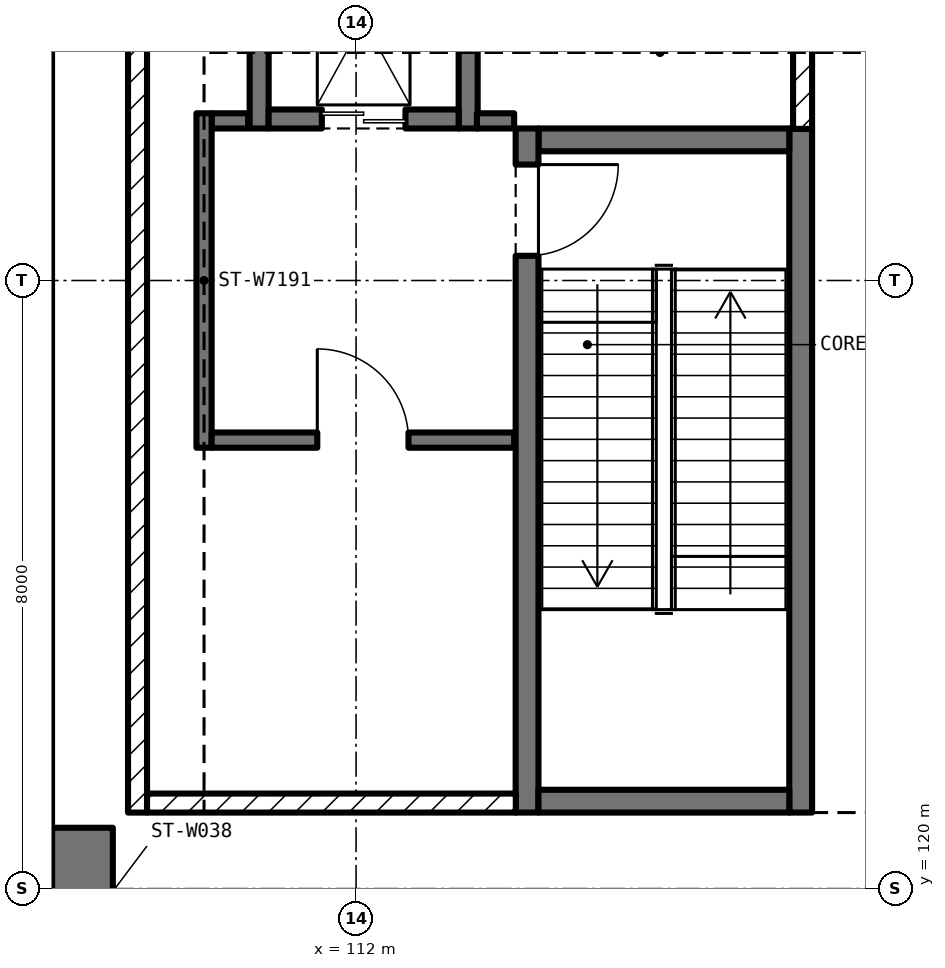
"""IFC4 building model, lengths in metres.
Left out: names, types, materials, properties, quantities, classifications, styles, units other than length and angle.
Written with IfcOpenShell. Run it as: python <this file> out.ifc"""

import sys

from ifc_helpers import new_model, si_unit, direction, frame, frame_2d, origin, place, context, subcontext, project, spatial, rectangle, extrude, element, fill, save


model = new_model("IFC4")
c1 = context("Model", 3, precision=1e-05, world=origin(), true_north=direction((0.0, 1.0)))
c2 = subcontext(c1, "Body", "Model", "MODEL_VIEW")
j1 = project(units=[si_unit("LENGTHUNIT", "METRE"), si_unit("PLANEANGLEUNIT", "RADIAN")], contexts=[c1])
p1 = place(None, origin())
s1 = spatial("IfcSite", under=j1, at=p1, CompositionType="ELEMENT")
p2 = place(p1, origin())
s2 = spatial("IfcBuilding", under=s1, at=p2, CompositionType="ELEMENT")
p3 = place(p2, frame((0.0, 0.0, 28.0)))
s3 = spatial("IfcBuildingStorey", under=s2, at=p3, CompositionType="ELEMENT", Elevation=28.0)
p4 = place(p3, frame((108.4, 95.2, 0.0), z_axis=(0.0, 0.0, 1.0), x_axis=(0.0, 1.0, 0.0)))
e1 = element("IfcWall", 1, at=p4, inside=s3, PredefinedType="SHEAR", context=c2, shape_type="SweptSolid", body=[
    extrude(rectangle(XDim=25.6, YDim=0.8, at=frame_2d((12.8, 0.0))), origin(), (0.0, 0.0, 1.0), 6.0),
])
p5 = place(p4, frame((1.1, 0.0, 2.6)))
e2 = element("IfcOpeningElement", 2, at=p5, cuts=e1, PredefinedType="OPENING", context=c2, shape_type="SweptSolid", body=[
    extrude(rectangle(XDim=2.4, YDim=1.2, at=frame_2d((1.2, 0.6))), frame((0.0, 0.412, 0.0), z_axis=(0.0, -1.0, 0.0), x_axis=(1.0, 0.0, 0.0)), (0.0, 0.0, 1.0), 0.824),
])
p6 = place(p4, frame((4.1, 0.0, 2.6)))
e3 = element("IfcOpeningElement", 3, at=p6, cuts=e1, PredefinedType="OPENING", context=c2, shape_type="SweptSolid", body=[
    extrude(rectangle(XDim=2.4, YDim=1.2, at=frame_2d((1.2, 0.6))), frame((0.0, 0.412, 0.0), z_axis=(0.0, -1.0, 0.0), x_axis=(1.0, 0.0, 0.0)), (0.0, 0.0, 1.0), 0.824),
])
p7 = place(p4, frame((7.1, 0.0, 2.6)))
e4 = element("IfcOpeningElement", 4, at=p7, cuts=e1, PredefinedType="OPENING", context=c2, shape_type="SweptSolid", body=[
    extrude(rectangle(XDim=2.4, YDim=1.2, at=frame_2d((1.2, 0.6))), frame((0.0, 0.412, 0.0), z_axis=(0.0, -1.0, 0.0), x_axis=(1.0, 0.0, 0.0)), (0.0, 0.0, 1.0), 0.824),
])
p8 = place(p4, frame((10.1, 0.0, 2.6)))
e5 = element("IfcOpeningElement", 5, at=p8, cuts=e1, PredefinedType="OPENING", context=c2, shape_type="SweptSolid", body=[
    extrude(rectangle(XDim=2.4, YDim=1.2, at=frame_2d((1.2, 0.6))), frame((0.0, 0.412, 0.0), z_axis=(0.0, -1.0, 0.0), x_axis=(1.0, 0.0, 0.0)), (0.0, 0.0, 1.0), 0.824),
])
p9 = place(p4, frame((13.1, 0.0, 2.6)))
e6 = element("IfcOpeningElement", 6, at=p9, cuts=e1, PredefinedType="OPENING", context=c2, shape_type="SweptSolid", body=[
    extrude(rectangle(XDim=2.4, YDim=1.2, at=frame_2d((1.2, 0.6))), frame((0.0, 0.412, 0.0), z_axis=(0.0, -1.0, 0.0), x_axis=(1.0, 0.0, 0.0)), (0.0, 0.0, 1.0), 0.824),
])
p10 = place(p4, frame((16.1, 0.0, 2.6)))
e7 = element("IfcOpeningElement", 7, at=p10, cuts=e1, PredefinedType="OPENING", context=c2, shape_type="SweptSolid", body=[
    extrude(rectangle(XDim=2.4, YDim=1.2, at=frame_2d((1.2, 0.6))), frame((0.0, 0.412, 0.0), z_axis=(0.0, -1.0, 0.0), x_axis=(1.0, 0.0, 0.0)), (0.0, 0.0, 1.0), 0.824),
])
p11 = place(p4, frame((19.1, 0.0, 2.6)))
e8 = element("IfcOpeningElement", 8, at=p11, cuts=e1, PredefinedType="OPENING", context=c2, shape_type="SweptSolid", body=[
    extrude(rectangle(XDim=2.4, YDim=1.2, at=frame_2d((1.2, 0.6))), frame((0.0, 0.412, 0.0), z_axis=(0.0, -1.0, 0.0), x_axis=(1.0, 0.0, 0.0)), (0.0, 0.0, 1.0), 0.824),
])
p12 = place(p4, frame((22.1, 0.0, 2.6)))
e9 = element("IfcOpeningElement", 9, at=p12, cuts=e1, PredefinedType="OPENING", context=c2, shape_type="SweptSolid", body=[
    extrude(rectangle(XDim=2.4, YDim=1.2, at=frame_2d((1.2, 0.6))), frame((0.0, 0.412, 0.0), z_axis=(0.0, -1.0, 0.0), x_axis=(1.0, 0.0, 0.0)), (0.0, 0.0, 1.0), 0.824),
])
p13 = place(p3, frame((117.85, 121.0, 0.0), z_axis=(0.0, 0.0, 1.0), x_axis=(0.0, 1.0, 0.0)))
e10 = element("IfcWall", 10, at=p13, inside=s3, PredefinedType="SOLIDWALL", context=c2, shape_type="SweptSolid", body=[
    extrude(rectangle(XDim=9.0, YDim=0.3, at=frame_2d((4.5, 0.0))), origin(), (0.0, 0.0, 1.0), 6.0),
])
p14 = place(p3, frame((117.7, 129.85, 0.0), z_axis=(0.0, 0.0, 1.0), x_axis=(-1.0, 0.0, 0.0)))
e11 = element("IfcWall", 11, at=p14, inside=s3, PredefinedType="SOLIDWALL", context=c2, shape_type="SweptSolid", body=[
    extrude(rectangle(XDim=3.3, YDim=0.3, at=frame_2d((1.65, 0.0))), origin(), (0.0, 0.0, 1.0), 6.0),
])
p15 = place(p3, frame((114.25, 130.0, 0.0), z_axis=(0.0, 0.0, 1.0), x_axis=(0.0, -1.0, 0.0)))
e12 = element("IfcWall", 12, at=p15, inside=s3, PredefinedType="SOLIDWALL", context=c2, shape_type="SweptSolid", body=[
    extrude(rectangle(XDim=9.0, YDim=0.3, at=frame_2d((4.5, 0.0))), origin(), (0.0, 0.0, 1.0), 6.0),
])
p16 = place(p15, frame((0.475, 0.0, 0.0)))
e13 = element("IfcOpeningElement", 13, at=p16, cuts=e12, PredefinedType="OPENING", context=c2, shape_type="SweptSolid", body=[
    extrude(rectangle(XDim=1.2, YDim=2.1, at=frame_2d((0.6, 1.05))), frame((0.0, 0.162, 0.0), z_axis=(0.0, -1.0, 0.0), x_axis=(1.0, 0.0, 0.0)), (0.0, 0.0, 1.0), 0.324),
])
p17 = place(p3, frame((114.4, 121.15, 0.0), z_axis=(0.0, 0.0, 1.0), x_axis=(1.0, 0.0, 0.0)))
e14 = element("IfcWall", 14, at=p17, inside=s3, PredefinedType="SOLIDWALL", context=c2, shape_type="SweptSolid", body=[
    extrude(rectangle(XDim=3.3, YDim=0.3, at=frame_2d((1.65, 0.0))), origin(), (0.0, 0.0, 1.0), 6.0),
])
for number, where, z_axis, x_axis in (
    (15, (113.475, 130.0, 0.0), (0.0, 0.0, 1.0), (0.0, 1.0, 0.0)),
    (16, (110.725, 134.0, 0.0), (0.0, 0.0, 1.0), (0.0, -1.0, 0.0)),
):
    element("IfcWall", number, at=place(p3, frame(where, z_axis=z_axis, x_axis=x_axis)), inside=s3, PredefinedType="SOLIDWALL", context=c2, shape_type="SweptSolid", body=[
        extrude(rectangle(XDim=4.0, YDim=0.25, at=frame_2d((2.0, 0.0))), origin(), (0.0, 0.0, 1.0), 6.0),
    ])
p18 = place(p3, frame((110.85, 130.125, 0.0), z_axis=(0.0, 0.0, 1.0), x_axis=(1.0, 0.0, 0.0)))
e17 = element("IfcWall", 17, at=p18, inside=s3, PredefinedType="SOLIDWALL", context=c2, shape_type="SweptSolid", body=[
    extrude(rectangle(XDim=2.5, YDim=0.25, at=frame_2d((1.25, 0.0))), origin(), (0.0, 0.0, 1.0), 6.0),
])
p19 = place(p18, frame((0.7, 0.0, 0.0)))
e18 = element("IfcOpeningElement", 18, at=p19, cuts=e17, PredefinedType="OPENING", context=c2, shape_type="SweptSolid", body=[
    extrude(rectangle(XDim=1.1, YDim=2.1, at=frame_2d((0.55, 1.05))), frame((0.0, 0.137, 0.0), z_axis=(0.0, -1.0, 0.0), x_axis=(1.0, 0.0, 0.0)), (0.0, 0.0, 1.0), 0.274),
])
p20 = place(p3, frame((114.08, 130.1, 0.0), z_axis=(0.0, 0.0, 1.0), x_axis=(-1.0, 0.0, 0.0)))
e19 = element("IfcWall", 19, at=p20, inside=s3, PredefinedType="PARTITIONING", context=c2, shape_type="SweptSolid", body=[
    extrude(rectangle(XDim=0.49, YDim=0.2, at=frame_2d((0.245, 0.0))), origin(), (0.0, 0.0, 1.0), 5.8),
])
p21 = place(p3, frame((110.58, 130.1, 0.0), z_axis=(0.0, 0.0, 1.0), x_axis=(-1.0, 0.0, 0.0)))
e20 = element("IfcWall", 20, at=p21, inside=s3, PredefinedType="PARTITIONING", context=c2, shape_type="SweptSolid", body=[
    extrude(rectangle(XDim=0.48, YDim=0.2, at=frame_2d((0.24, 0.0))), origin(), (0.0, 0.0, 1.0), 5.8),
])
p22 = place(p3, frame((110.0, 130.2, 0.0), z_axis=(0.0, 0.0, 1.0), x_axis=(0.0, -1.0, 0.0)))
e21 = element("IfcWall", 21, at=p22, inside=s3, PredefinedType="PARTITIONING", context=c2, shape_type="SweptSolid", body=[
    extrude(rectangle(XDim=4.4, YDim=0.2, at=frame_2d((2.2, 0.0))), origin(), (0.0, 0.0, 1.0), 5.8),
])
p23 = place(p3, frame((110.1, 125.9, 0.0), z_axis=(0.0, 0.0, 1.0), x_axis=(1.0, 0.0, 0.0)))
e22 = element("IfcWall", 22, at=p23, inside=s3, PredefinedType="PARTITIONING", context=c2, shape_type="SweptSolid", body=[
    extrude(rectangle(XDim=3.98, YDim=0.2, at=frame_2d((1.99, 0.0))), origin(), (0.0, 0.0, 1.0), 5.8),
])
p24 = place(p23, frame((1.39, 0.0, 0.0)))
e23 = element("IfcOpeningElement", 23, at=p24, cuts=e22, PredefinedType="OPENING", context=c2, shape_type="SweptSolid", body=[
    extrude(rectangle(XDim=1.2, YDim=2.1, at=frame_2d((0.6, 1.05))), frame((0.0, 0.112, 0.0), z_axis=(0.0, -1.0, 0.0), x_axis=(1.0, 0.0, 0.0)), (0.0, 0.0, 1.0), 0.224),
])
p25 = place(p3, frame((106.0, 118.0, 0.0), z_axis=(0.0, 0.0, 1.0), x_axis=(0.707106781187, 0.707106781187, 0.0)))
e24 = element("IfcWall", 24, at=p25, inside=s3, PredefinedType="PARTITIONING", context=c2, shape_type="SweptSolid", body=[
    extrude(rectangle(XDim=2.827, YDim=0.1, at=frame_2d((1.414, 0.0))), origin(), (0.0, 0.0, 1.0), 4.9),
])
p26 = place(p3, frame((117.875, 129.995, 0.0), z_axis=(0.0, 0.0, 1.0), x_axis=(0.0, 1.0, 0.0)))
e25 = element("IfcWall", 25, at=p26, inside=s3, PredefinedType="SOLIDWALL", context=c2, shape_type="SweptSolid", body=[
    extrude(rectangle(XDim=5.005, YDim=0.25, at=frame_2d((2.502, 0.0))), origin(), (0.0, 0.0, 1.0), 5.8),
])
p27 = place(p26, frame((1.43, 0.0, 2.6)))
e26 = element("IfcOpeningElement", 26, at=p27, cuts=e25, PredefinedType="OPENING", context=c2, shape_type="SweptSolid", body=[
    extrude(rectangle(XDim=2.4, YDim=1.2, at=frame_2d((1.2, 0.6))), frame((0.0, 0.137, 0.0), z_axis=(0.0, -1.0, 0.0), x_axis=(1.0, 0.0, 0.0)), (0.0, 0.0, 1.0), 0.274),
])
p28 = place(p3, frame((109.125, 134.75, 0.0), z_axis=(0.0, 0.0, 1.0), x_axis=(0.0, -1.0, 0.0)))
e27 = element("IfcWall", 27, at=p28, inside=s3, PredefinedType="SOLIDWALL", context=c2, shape_type="SweptSolid", body=[
    extrude(rectangle(XDim=13.75, YDim=0.25, at=frame_2d((6.875, 0.0))), origin(), (0.0, 0.0, 1.0), 5.8),
])
p29 = place(p3, frame((109.25, 121.125, 0.0), z_axis=(0.0, 0.0, 1.0), x_axis=(1.0, 0.0, 0.0)))
e28 = element("IfcWall", 28, at=p29, inside=s3, PredefinedType="SOLIDWALL", context=c2, shape_type="SweptSolid", body=[
    extrude(rectangle(XDim=4.852, YDim=0.25, at=frame_2d((2.426, 0.0))), origin(), (0.0, 0.0, 1.0), 5.8),
])
p30 = place(p16, origin())
e29 = element("IfcDoor", 29, at=p30, inside=s3, OperationType="SINGLE_SWING_LEFT", PredefinedType="DOOR", context=c2, shape_type="SweptSolid", body=[
    extrude(rectangle(XDim=1.2, YDim=2.1, at=frame_2d((0.6, 1.05))), frame((0.0, 0.025, 0.0), z_axis=(0.0, -1.0, 0.0), x_axis=(1.0, 0.0, 0.0)), (0.0, 0.0, 1.0), 0.05),
])
fill(e13, e29)
p31 = place(p19, origin())
e30 = element("IfcDoor", 30, at=p31, inside=s3, OperationType="DOUBLE_DOOR_SLIDING", PredefinedType="DOOR", context=c2, shape_type="SweptSolid", body=[
    extrude(rectangle(XDim=1.1, YDim=2.1, at=frame_2d((0.55, 1.05))), frame((0.0, 0.025, 0.0), z_axis=(0.0, -1.0, 0.0), x_axis=(1.0, 0.0, 0.0)), (0.0, 0.0, 1.0), 0.05),
])
fill(e18, e30)
p32 = place(p24, origin())
e31 = element("IfcDoor", 31, at=p32, inside=s3, OperationType="SINGLE_SWING_LEFT", PredefinedType="DOOR", context=c2, shape_type="SweptSolid", body=[
    extrude(rectangle(XDim=1.2, YDim=2.1, at=frame_2d((0.6, 1.05))), frame((0.0, 0.025, 0.0), z_axis=(0.0, -1.0, 0.0), x_axis=(1.0, 0.0, 0.0)), (0.0, 0.0, 1.0), 0.05),
])
fill(e23, e31)
save(model, sys.argv[1])
